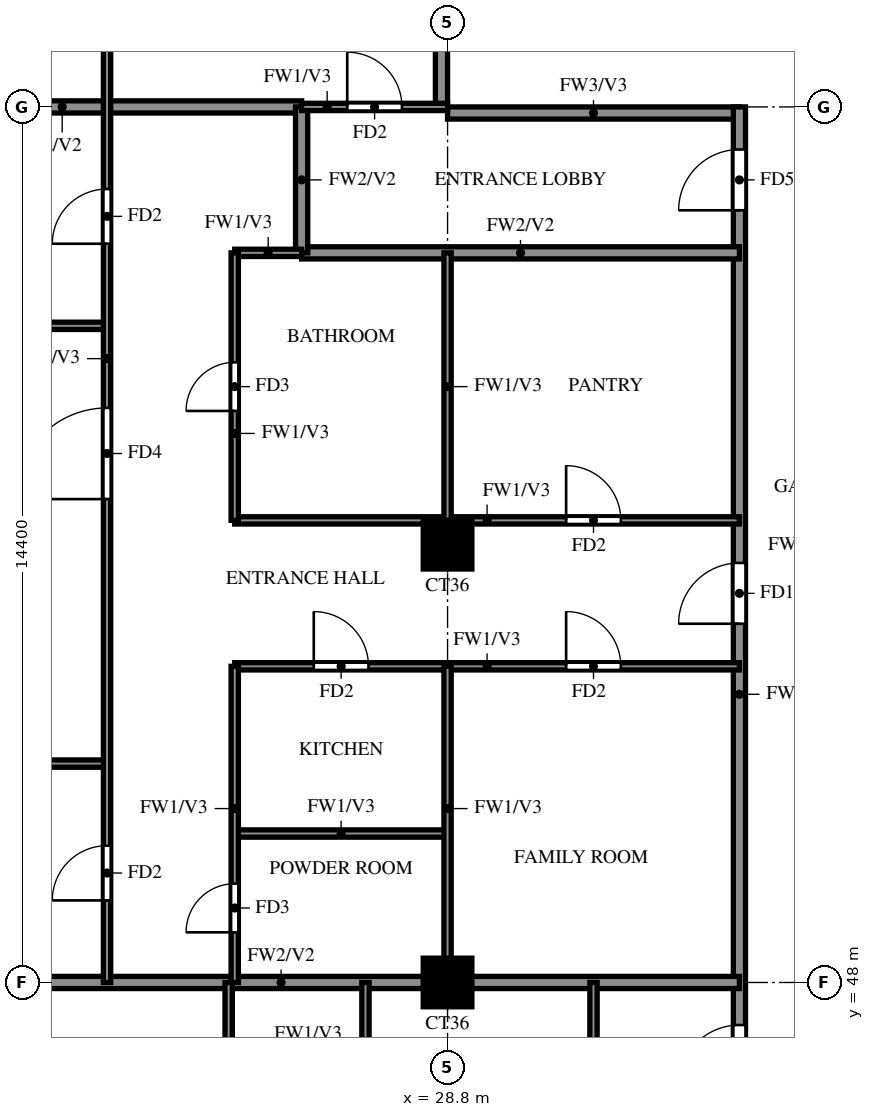
"""IFC4 building model, lengths in metres.
Left out: names, types, materials, properties, quantities, classifications, styles, units other than length and angle.
Written with IfcOpenShell. Run it as: python <this file> out.ifc"""

import sys

from ifc_helpers import new_model, si_unit, direction, frame, frame_2d, origin, origin_2d, place, context, subcontext, project, spatial, rectangle, extrude, source, transform, mapped, element, fill, save


model = new_model("IFC4")
c1 = context("Model", 3, precision=1e-05, world=origin(), true_north=direction((0.0, 1.0)))
c2 = subcontext(c1, "Body", "Model", "MODEL_VIEW")
j1 = project(units=[si_unit("LENGTHUNIT", "METRE"), si_unit("PLANEANGLEUNIT", "RADIAN")], contexts=[c1])
p1 = place(None, origin())
s1 = spatial("IfcSite", under=j1, at=p1, CompositionType="ELEMENT")
p2 = place(p1, origin())
s2 = spatial("IfcBuilding", under=s1, at=p2, CompositionType="ELEMENT")
p3 = place(p2, frame((0.0, 0.0, 250.0)))
s3 = spatial("IfcBuildingStorey", under=s2, at=p3, CompositionType="ELEMENT", Elevation=250.0)
m1 = source(origin(), c2, "Body", "SweptSolid", [
    extrude(rectangle(XDim=0.8, YDim=0.8, at=origin_2d()), origin(), (0.0, 0.0, 1.0), 3.22),
])
for number, where, z_axis, x_axis in (
    (1, (28.8, 48.0, 0.0), (0.0, 0.0, 1.0), (1.0, 0.0, 0.0)),
    (2, (28.8, 55.2, 0.0), (0.0, 0.0, 1.0), (1.0, 0.0, 0.0)),
):
    element("IfcColumn", number, at=place(p3, frame(where, z_axis=z_axis, x_axis=x_axis)), inside=s3, PredefinedType="COLUMN", context=c2, shape_type="MappedRepresentation", body=[
        mapped(m1, transform((0.0, 0.0, 0.0))),
    ])
p4 = place(p3, frame((28.8, 62.3, 0.0), z_axis=(0.0, 0.0, 1.0), x_axis=(1.0, 0.0, 0.0)))
e3 = element("IfcWall", 3, at=p4, inside=s3, PredefinedType="SOLIDWALL", context=c2, shape_type="SweptSolid", body=[
    extrude(rectangle(XDim=4.8, YDim=0.2, at=frame_2d((2.4, 0.0))), origin(), (0.0, 0.0, 1.0), 3.22),
])
p5 = place(p3, frame((28.7, 62.4, 0.0), z_axis=(0.0, 0.0, 1.0), x_axis=(0.0, 1.0, 0.0)))
e4 = element("IfcWall", 4, at=p5, inside=s3, PredefinedType="SOLIDWALL", context=c2, shape_type="SweptSolid", body=[
    extrude(rectangle(XDim=15.6, YDim=0.2, at=frame_2d((7.8, 0.0))), origin(), (0.0, 0.0, 1.0), 3.22),
])
p6 = place(p3, frame((33.6, 45.6, 0.0), z_axis=(0.0, 0.0, 1.0), x_axis=(0.0, 1.0, 0.0)))
e5 = element("IfcWall", 5, at=p6, inside=s3, PredefinedType="SOLIDWALL", context=c2, shape_type="SweptSolid", body=[
    extrude(rectangle(XDim=16.8, YDim=0.2, at=frame_2d((8.4, 0.0))), origin(), (0.0, 0.0, 1.0), 3.22),
])
p7 = place(p6, frame((0.7, 0.0, 0.0)))
e6 = element("IfcOpeningElement", 6, at=p7, cuts=e5, PredefinedType="OPENING", context=c2, shape_type="SweptSolid", body=[
    extrude(rectangle(XDim=1.0, YDim=2.1, at=frame_2d((0.5, 1.05))), frame((0.0, 0.11, 0.0), z_axis=(0.0, -1.0, 0.0), x_axis=(1.0, 0.0, 0.0)), (0.0, 0.0, 1.0), 0.22),
])
p8 = place(p6, frame((8.3, 0.0, 0.0)))
e7 = element("IfcOpeningElement", 7, at=p8, cuts=e5, PredefinedType="OPENING", context=c2, shape_type="SweptSolid", body=[
    extrude(rectangle(XDim=1.0, YDim=2.1, at=frame_2d((0.5, 1.05))), frame((0.0, 0.11, 0.0), z_axis=(0.0, -1.0, 0.0), x_axis=(1.0, 0.0, 0.0)), (0.0, 0.0, 1.0), 0.22),
])
p9 = place(p6, frame((15.1, 0.0, 0.0)))
e8 = element("IfcOpeningElement", 8, at=p9, cuts=e5, PredefinedType="OPENING", context=c2, shape_type="SweptSolid", body=[
    extrude(rectangle(XDim=1.0, YDim=2.1, at=frame_2d((0.5, 1.05))), frame((0.0, 0.11, 0.0), z_axis=(0.0, -1.0, 0.0), x_axis=(1.0, 0.0, 0.0)), (0.0, 0.0, 1.0), 0.22),
])
p10 = place(p3, frame((18.525, 48.0, 0.0), z_axis=(0.0, 0.0, 1.0), x_axis=(1.0, 0.0, 0.0)))
e9 = element("IfcWall", 9, at=p10, inside=s3, PredefinedType="SOLIDWALL", context=c2, shape_type="SweptSolid", body=[
    extrude(rectangle(XDim=15.075, YDim=0.2, at=frame_2d((7.538, 0.0))), origin(), (0.0, 0.0, 1.0), 3.22),
])
p11 = place(p3, frame((26.4, 60.0, 0.0), z_axis=(0.0, 0.0, 1.0), x_axis=(1.0, 0.0, 0.0)))
e10 = element("IfcWall", 10, at=p11, inside=s3, PredefinedType="SOLIDWALL", context=c2, shape_type="SweptSolid", body=[
    extrude(rectangle(XDim=7.2, YDim=0.2, at=frame_2d((3.6, 0.0))), origin(), (0.0, 0.0, 1.0), 3.22),
])
p12 = place(p3, frame((18.525, 62.4, 0.0), z_axis=(0.0, 0.0, 1.0), x_axis=(1.0, 0.0, 0.0)))
e11 = element("IfcWall", 11, at=p12, inside=s3, PredefinedType="SOLIDWALL", context=c2, shape_type="SweptSolid", body=[
    extrude(rectangle(XDim=7.875, YDim=0.2, at=frame_2d((3.938, 0.0))), origin(), (0.0, 0.0, 1.0), 3.22),
])
p13 = place(p3, frame((26.4, 60.0, 0.0), z_axis=(0.0, 0.0, 1.0), x_axis=(0.0, 1.0, 0.0)))
e12 = element("IfcWall", 12, at=p13, inside=s3, PredefinedType="SOLIDWALL", context=c2, shape_type="SweptSolid", body=[
    extrude(rectangle(XDim=2.4, YDim=0.2, at=frame_2d((1.2, 0.0))), origin(), (0.0, 0.0, 1.0), 3.22),
])
p14 = place(p3, frame((25.3, 50.45, 0.0), z_axis=(0.0, 0.0, 1.0), x_axis=(1.0, 0.0, 0.0)))
e13 = element("IfcWall", 13, at=p14, inside=s3, PredefinedType="PARTITIONING", context=c2, shape_type="SweptSolid", body=[
    extrude(rectangle(XDim=3.5, YDim=0.12, at=frame_2d((1.75, 0.0))), origin(), (0.0, 0.0, 1.0), 3.22),
])
p15 = place(p3, frame((18.525, 51.6, 0.0), z_axis=(0.0, 0.0, 1.0), x_axis=(1.0, 0.0, 0.0)))
e14 = element("IfcWall", 14, at=p15, inside=s3, PredefinedType="PARTITIONING", context=c2, shape_type="SweptSolid", body=[
    extrude(rectangle(XDim=4.675, YDim=0.12, at=frame_2d((2.337, 0.0))), origin(), (0.0, 0.0, 1.0), 2.32),
])
p16 = place(p3, frame((25.3, 53.2, 0.0), z_axis=(0.0, 0.0, 1.0), x_axis=(1.0, 0.0, 0.0)))
e15 = element("IfcWall", 15, at=p16, inside=s3, PredefinedType="PARTITIONING", context=c2, shape_type="SweptSolid", body=[
    extrude(rectangle(XDim=8.3, YDim=0.12, at=frame_2d((4.15, 0.0))), origin(), (0.0, 0.0, 1.0), 3.22),
])
p17 = place(p16, frame((1.3, 0.0, 0.0)))
e16 = element("IfcOpeningElement", 16, at=p17, cuts=e15, PredefinedType="OPENING", context=c2, shape_type="SweptSolid", body=[
    extrude(rectangle(XDim=0.9, YDim=2.1, at=frame_2d((0.45, 1.05))), frame((0.0, 0.07, 0.0), z_axis=(0.0, -1.0, 0.0), x_axis=(1.0, 0.0, 0.0)), (0.0, 0.0, 1.0), 0.14),
])
p18 = place(p16, frame((5.45, 0.0, 0.0)))
e17 = element("IfcOpeningElement", 17, at=p18, cuts=e15, PredefinedType="OPENING", context=c2, shape_type="SweptSolid", body=[
    extrude(rectangle(XDim=0.9, YDim=2.1, at=frame_2d((0.45, 1.05))), frame((0.0, 0.07, 0.0), z_axis=(0.0, -1.0, 0.0), x_axis=(1.0, 0.0, 0.0)), (0.0, 0.0, 1.0), 0.14),
])
p19 = place(p3, frame((25.3, 55.6, 0.0), z_axis=(0.0, 0.0, 1.0), x_axis=(1.0, 0.0, 0.0)))
e18 = element("IfcWall", 18, at=p19, inside=s3, PredefinedType="PARTITIONING", context=c2, shape_type="SweptSolid", body=[
    extrude(rectangle(XDim=8.3, YDim=0.12, at=frame_2d((4.15, 0.0))), origin(), (0.0, 0.0, 1.0), 3.22),
])
p20 = place(p19, frame((5.45, 0.0, 0.0)))
e19 = element("IfcOpeningElement", 19, at=p20, cuts=e18, PredefinedType="OPENING", context=c2, shape_type="SweptSolid", body=[
    extrude(rectangle(XDim=0.9, YDim=2.1, at=frame_2d((0.45, 1.05))), frame((0.0, 0.07, 0.0), z_axis=(0.0, -1.0, 0.0), x_axis=(1.0, 0.0, 0.0)), (0.0, 0.0, 1.0), 0.14),
])
p21 = place(p3, frame((18.525, 58.8, 0.0), z_axis=(0.0, 0.0, 1.0), x_axis=(1.0, 0.0, 0.0)))
e20 = element("IfcWall", 20, at=p21, inside=s3, PredefinedType="PARTITIONING", context=c2, shape_type="SweptSolid", body=[
    extrude(rectangle(XDim=4.675, YDim=0.12, at=frame_2d((2.337, 0.0))), origin(), (0.0, 0.0, 1.0), 2.32),
])
p22 = place(p3, frame((25.3, 60.0, 0.0), z_axis=(0.0, 0.0, 1.0), x_axis=(1.0, 0.0, 0.0)))
e21 = element("IfcWall", 21, at=p22, inside=s3, PredefinedType="PARTITIONING", context=c2, shape_type="SweptSolid", body=[
    extrude(rectangle(XDim=1.1, YDim=0.12, at=frame_2d((0.55, 0.0))), origin(), (0.0, 0.0, 1.0), 3.22),
])
p23 = place(p3, frame((26.4, 62.4, 0.0), z_axis=(0.0, 0.0, 1.0), x_axis=(1.0, 0.0, 0.0)))
e22 = element("IfcWall", 22, at=p23, inside=s3, PredefinedType="PARTITIONING", context=c2, shape_type="SweptSolid", body=[
    extrude(rectangle(XDim=2.4, YDim=0.12, at=frame_2d((1.2, 0.0))), origin(), (0.0, 0.0, 1.0), 3.22),
])
p24 = place(p23, frame((0.75, 0.0, 0.0)))
e23 = element("IfcOpeningElement", 23, at=p24, cuts=e22, PredefinedType="OPENING", context=c2, shape_type="SweptSolid", body=[
    extrude(rectangle(XDim=0.9, YDim=2.1, at=frame_2d((0.45, 1.05))), frame((0.0, 0.07, 0.0), z_axis=(0.0, -1.0, 0.0), x_axis=(1.0, 0.0, 0.0)), (0.0, 0.0, 1.0), 0.14),
])
p25 = place(p3, frame((23.2, 48.0, 0.0), z_axis=(0.0, 0.0, 1.0), x_axis=(0.0, 1.0, 0.0)))
e24 = element("IfcWall", 24, at=p25, inside=s3, PredefinedType="PARTITIONING", context=c2, shape_type="SweptSolid", body=[
    extrude(rectangle(XDim=21.6, YDim=0.12, at=frame_2d((10.8, 0.0))), origin(), (0.0, 0.0, 1.0), 3.22),
])
p26 = place(p25, frame((1.35, 0.0, 0.0)))
e25 = element("IfcOpeningElement", 25, at=p26, cuts=e24, PredefinedType="OPENING", context=c2, shape_type="SweptSolid", body=[
    extrude(rectangle(XDim=0.9, YDim=2.1, at=frame_2d((0.45, 1.05))), frame((0.0, 0.07, 0.0), z_axis=(0.0, -1.0, 0.0), x_axis=(1.0, 0.0, 0.0)), (0.0, 0.0, 1.0), 0.14),
])
p27 = place(p25, frame((7.95, 0.0, 0.0)))
e26 = element("IfcOpeningElement", 26, at=p27, cuts=e24, PredefinedType="OPENING", context=c2, shape_type="SweptSolid", body=[
    extrude(rectangle(XDim=1.5, YDim=2.1, at=frame_2d((0.75, 1.05))), frame((0.0, 0.07, 0.0), z_axis=(0.0, -1.0, 0.0), x_axis=(1.0, 0.0, 0.0)), (0.0, 0.0, 1.0), 0.14),
])
p28 = place(p25, frame((12.15, 0.0, 0.0)))
e27 = element("IfcOpeningElement", 27, at=p28, cuts=e24, PredefinedType="OPENING", context=c2, shape_type="SweptSolid", body=[
    extrude(rectangle(XDim=0.9, YDim=2.1, at=frame_2d((0.45, 1.05))), frame((0.0, 0.07, 0.0), z_axis=(0.0, -1.0, 0.0), x_axis=(1.0, 0.0, 0.0)), (0.0, 0.0, 1.0), 0.14),
])
p29 = place(p25, frame((15.75, 0.0, 0.0)))
e28 = element("IfcOpeningElement", 28, at=p29, cuts=e24, PredefinedType="OPENING", context=c2, shape_type="SweptSolid", body=[
    extrude(rectangle(XDim=0.9, YDim=2.1, at=frame_2d((0.45, 1.05))), frame((0.0, 0.07, 0.0), z_axis=(0.0, -1.0, 0.0), x_axis=(1.0, 0.0, 0.0)), (0.0, 0.0, 1.0), 0.14),
])
p30 = place(p25, frame((19.35, 0.0, 0.0)))
e29 = element("IfcOpeningElement", 29, at=p30, cuts=e24, PredefinedType="OPENING", context=c2, shape_type="SweptSolid", body=[
    extrude(rectangle(XDim=0.9, YDim=2.1, at=frame_2d((0.45, 1.05))), frame((0.0, 0.07, 0.0), z_axis=(0.0, -1.0, 0.0), x_axis=(1.0, 0.0, 0.0)), (0.0, 0.0, 1.0), 0.14),
])
p31 = place(p3, frame((25.2, 39.725, 0.0), z_axis=(0.0, 0.0, 1.0), x_axis=(0.0, 1.0, 0.0)))
e30 = element("IfcWall", 30, at=p31, inside=s3, PredefinedType="PARTITIONING", context=c2, shape_type="SweptSolid", body=[
    extrude(rectangle(XDim=8.275, YDim=0.12, at=frame_2d((4.137, 0.0))), origin(), (0.0, 0.0, 1.0), 3.22),
])
p32 = place(p31, frame((4.525, 0.0, 0.0)))
e31 = element("IfcOpeningElement", 31, at=p32, cuts=e30, PredefinedType="OPENING", context=c2, shape_type="SweptSolid", body=[
    extrude(rectangle(XDim=0.9, YDim=2.1, at=frame_2d((0.45, 1.05))), frame((0.0, 0.07, 0.0), z_axis=(0.0, -1.0, 0.0), x_axis=(1.0, 0.0, 0.0)), (0.0, 0.0, 1.0), 0.14),
])
p33 = place(p3, frame((25.3, 48.0, 0.0), z_axis=(0.0, 0.0, 1.0), x_axis=(0.0, 1.0, 0.0)))
e32 = element("IfcWall", 32, at=p33, inside=s3, PredefinedType="PARTITIONING", context=c2, shape_type="SweptSolid", body=[
    extrude(rectangle(XDim=5.2, YDim=0.12, at=frame_2d((2.6, 0.0))), origin(), (0.0, 0.0, 1.0), 3.22),
])
p34 = place(p33, frame((0.825, 0.0, 0.0)))
e33 = element("IfcOpeningElement", 33, at=p34, cuts=e32, PredefinedType="OPENING", context=c2, shape_type="SweptSolid", body=[
    extrude(rectangle(XDim=0.8, YDim=2.1, at=frame_2d((0.4, 1.05))), frame((0.0, 0.07, 0.0), z_axis=(0.0, -1.0, 0.0), x_axis=(1.0, 0.0, 0.0)), (0.0, 0.0, 1.0), 0.14),
])
p35 = place(p3, frame((25.3, 55.6, 0.0), z_axis=(0.0, 0.0, 1.0), x_axis=(0.0, 1.0, 0.0)))
e34 = element("IfcWall", 34, at=p35, inside=s3, PredefinedType="PARTITIONING", context=c2, shape_type="SweptSolid", body=[
    extrude(rectangle(XDim=4.4, YDim=0.12, at=frame_2d((2.2, 0.0))), origin(), (0.0, 0.0, 1.0), 3.22),
])
p36 = place(p35, frame((1.8, 0.0, 0.0)))
e35 = element("IfcOpeningElement", 35, at=p36, cuts=e34, PredefinedType="OPENING", context=c2, shape_type="SweptSolid", body=[
    extrude(rectangle(XDim=0.8, YDim=2.1, at=frame_2d((0.4, 1.05))), frame((0.0, 0.07, 0.0), z_axis=(0.0, -1.0, 0.0), x_axis=(1.0, 0.0, 0.0)), (0.0, 0.0, 1.0), 0.14),
])
p37 = place(p3, frame((27.45, 45.6, 0.0), z_axis=(0.0, 0.0, 1.0), x_axis=(0.0, 1.0, 0.0)))
e36 = element("IfcWall", 36, at=p37, inside=s3, PredefinedType="PARTITIONING", context=c2, shape_type="SweptSolid", body=[
    extrude(rectangle(XDim=2.4, YDim=0.12, at=frame_2d((1.2, 0.0))), origin(), (0.0, 0.0, 1.0), 3.22),
])
p38 = place(p3, frame((28.8, 48.0, 0.0), z_axis=(0.0, 0.0, 1.0), x_axis=(0.0, 1.0, 0.0)))
e37 = element("IfcWall", 37, at=p38, inside=s3, PredefinedType="PARTITIONING", context=c2, shape_type="SweptSolid", body=[
    extrude(rectangle(XDim=5.2, YDim=0.12, at=frame_2d((2.6, 0.0))), origin(), (0.0, 0.0, 1.0), 3.22),
])
p39 = place(p3, frame((28.8, 55.6, 0.0), z_axis=(0.0, 0.0, 1.0), x_axis=(0.0, 1.0, 0.0)))
e38 = element("IfcWall", 38, at=p39, inside=s3, PredefinedType="PARTITIONING", context=c2, shape_type="SweptSolid", body=[
    extrude(rectangle(XDim=4.4, YDim=0.12, at=frame_2d((2.2, 0.0))), origin(), (0.0, 0.0, 1.0), 3.22),
])
p40 = place(p3, frame((31.2, 45.6, 0.0), z_axis=(0.0, 0.0, 1.0), x_axis=(0.0, 1.0, 0.0)))
e39 = element("IfcWall", 39, at=p40, inside=s3, PredefinedType="PARTITIONING", context=c2, shape_type="SweptSolid", body=[
    extrude(rectangle(XDim=2.4, YDim=0.12, at=frame_2d((1.2, 0.0))), origin(), (0.0, 0.0, 1.0), 3.22),
])
p41 = place(p7, origin())
e40 = element("IfcDoor", 40, at=p41, inside=s3, OperationType="SINGLE_SWING_LEFT", PredefinedType="DOOR", context=c2, shape_type="SweptSolid", body=[
    extrude(rectangle(XDim=1.0, YDim=2.1, at=frame_2d((0.5, 1.05))), frame((0.0, 0.025, 0.0), z_axis=(0.0, -1.0, 0.0), x_axis=(1.0, 0.0, 0.0)), (0.0, 0.0, 1.0), 0.05),
])
fill(e6, e40)
p42 = place(p8, origin())
e41 = element("IfcDoor", 41, at=p42, inside=s3, OperationType="SINGLE_SWING_LEFT", PredefinedType="DOOR", context=c2, shape_type="SweptSolid", body=[
    extrude(rectangle(XDim=1.0, YDim=2.1, at=frame_2d((0.5, 1.05))), frame((0.0, 0.025, 0.0), z_axis=(0.0, -1.0, 0.0), x_axis=(1.0, 0.0, 0.0)), (0.0, 0.0, 1.0), 0.05),
])
fill(e7, e41)
p43 = place(p26, origin())
e42 = element("IfcDoor", 42, at=p43, inside=s3, OperationType="SINGLE_SWING_RIGHT", PredefinedType="DOOR", context=c2, shape_type="SweptSolid", body=[
    extrude(rectangle(XDim=0.9, YDim=2.1, at=frame_2d((0.45, 1.05))), frame((0.0, 0.025, 0.0), z_axis=(0.0, -1.0, 0.0), x_axis=(1.0, 0.0, 0.0)), (0.0, 0.0, 1.0), 0.05),
])
fill(e25, e42)
p44 = place(p27, origin())
e43 = element("IfcDoor", 43, at=p44, inside=s3, OperationType="SINGLE_SWING_RIGHT", PredefinedType="DOOR", context=c2, shape_type="SweptSolid", body=[
    extrude(rectangle(XDim=1.5, YDim=2.1, at=frame_2d((0.75, 1.05))), frame((0.0, 0.025, 0.0), z_axis=(0.0, -1.0, 0.0), x_axis=(1.0, 0.0, 0.0)), (0.0, 0.0, 1.0), 0.05),
])
fill(e26, e43)
p45 = place(p28, origin())
e44 = element("IfcDoor", 44, at=p45, inside=s3, OperationType="SINGLE_SWING_LEFT", PredefinedType="DOOR", context=c2, shape_type="SweptSolid", body=[
    extrude(rectangle(XDim=0.9, YDim=2.1, at=frame_2d((0.45, 1.05))), frame((0.0, 0.025, 0.0), z_axis=(0.0, -1.0, 0.0), x_axis=(1.0, 0.0, 0.0)), (0.0, 0.0, 1.0), 0.05),
])
fill(e27, e44)
p46 = place(p34, origin())
e45 = element("IfcDoor", 45, at=p46, inside=s3, OperationType="SINGLE_SWING_RIGHT", PredefinedType="DOOR", context=c2, shape_type="SweptSolid", body=[
    extrude(rectangle(XDim=0.8, YDim=2.1, at=frame_2d((0.4, 1.05))), frame((0.0, 0.025, 0.0), z_axis=(0.0, -1.0, 0.0), x_axis=(1.0, 0.0, 0.0)), (0.0, 0.0, 1.0), 0.05),
])
fill(e33, e45)
p47 = place(p17, origin())
e46 = element("IfcDoor", 46, at=p47, inside=s3, OperationType="SINGLE_SWING_LEFT", PredefinedType="DOOR", context=c2, shape_type="SweptSolid", body=[
    extrude(rectangle(XDim=0.9, YDim=2.1, at=frame_2d((0.45, 1.05))), frame((0.0, 0.025, 0.0), z_axis=(0.0, -1.0, 0.0), x_axis=(1.0, 0.0, 0.0)), (0.0, 0.0, 1.0), 0.05),
])
fill(e16, e46)
p48 = place(p36, origin())
e47 = element("IfcDoor", 47, at=p48, inside=s3, OperationType="SINGLE_SWING_LEFT", PredefinedType="DOOR", context=c2, shape_type="SweptSolid", body=[
    extrude(rectangle(XDim=0.8, YDim=2.1, at=frame_2d((0.4, 1.05))), frame((0.0, 0.025, 0.0), z_axis=(0.0, -1.0, 0.0), x_axis=(1.0, 0.0, 0.0)), (0.0, 0.0, 1.0), 0.05),
])
fill(e35, e47)
p49 = place(p18, origin())
e48 = element("IfcDoor", 48, at=p49, inside=s3, OperationType="SINGLE_SWING_RIGHT", PredefinedType="DOOR", context=c2, shape_type="SweptSolid", body=[
    extrude(rectangle(XDim=0.9, YDim=2.1, at=frame_2d((0.45, 1.05))), frame((0.0, 0.025, 0.0), z_axis=(0.0, -1.0, 0.0), x_axis=(1.0, 0.0, 0.0)), (0.0, 0.0, 1.0), 0.05),
])
fill(e17, e48)
p50 = place(p20, origin())
e49 = element("IfcDoor", 49, at=p50, inside=s3, OperationType="SINGLE_SWING_LEFT", PredefinedType="DOOR", context=c2, shape_type="SweptSolid", body=[
    extrude(rectangle(XDim=0.9, YDim=2.1, at=frame_2d((0.45, 1.05))), frame((0.0, 0.025, 0.0), z_axis=(0.0, -1.0, 0.0), x_axis=(1.0, 0.0, 0.0)), (0.0, 0.0, 1.0), 0.05),
])
fill(e19, e49)
p51 = place(p24, origin())
e50 = element("IfcDoor", 50, at=p51, inside=s3, OperationType="SINGLE_SWING_LEFT", PredefinedType="DOOR", context=c2, shape_type="SweptSolid", body=[
    extrude(rectangle(XDim=0.9, YDim=2.1, at=frame_2d((0.45, 1.05))), frame((0.0, 0.025, 0.0), z_axis=(0.0, -1.0, 0.0), x_axis=(1.0, 0.0, 0.0)), (0.0, 0.0, 1.0), 0.05),
])
fill(e23, e50)
p52 = place(p9, origin())
e51 = element("IfcDoor", 51, at=p52, inside=s3, OperationType="SINGLE_SWING_RIGHT", PredefinedType="DOOR", context=c2, shape_type="SweptSolid", body=[
    extrude(rectangle(XDim=1.0, YDim=2.1, at=frame_2d((0.5, 1.05))), frame((0.0, 0.025, 0.0), z_axis=(0.0, -1.0, 0.0), x_axis=(1.0, 0.0, 0.0)), (0.0, 0.0, 1.0), 0.05),
])
fill(e8, e51)
save(model, sys.argv[1])
